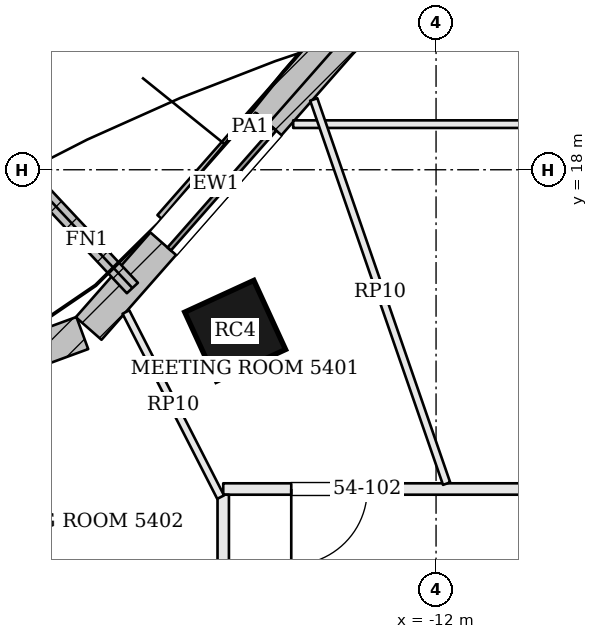
"""IFC4 building model, lengths in metres.
Left out: names, types, materials, properties, quantities, classifications, styles, units other than length and angle.
Written with IfcOpenShell. Run it as: python <this file> out.ifc"""

import sys

from ifc_helpers import new_model, si_unit, direction, frame, frame_2d, origin, origin_2d, place, context, subcontext, project, spatial, rectangle, extrude, element, fill, save


model = new_model("IFC4")
c1 = context("Model", 3, precision=1e-05, world=origin(), true_north=direction((0.0, 1.0)))
c2 = subcontext(c1, "Body", "Model", "MODEL_VIEW")
j1 = project(units=[si_unit("LENGTHUNIT", "METRE"), si_unit("PLANEANGLEUNIT", "RADIAN")], contexts=[c1])
p1 = place(None, origin())
s1 = spatial("IfcSite", under=j1, at=p1, CompositionType="ELEMENT")
p2 = place(p1, origin())
s2 = spatial("IfcBuilding", under=s1, at=p2, CompositionType="ELEMENT")
p3 = place(p2, frame((0.0, 0.0, 221.4)))
s3 = spatial("IfcBuildingStorey", under=s2, at=p3, CompositionType="ELEMENT", Elevation=221.4)
p4 = place(p3, frame((-14.643, 15.881, 0.0), z_axis=(0.0, 0.0, 1.0), x_axis=(-0.908778580451, -0.417278673927, 0.0)))
e1 = element("IfcColumn", 1, at=p4, inside=s3, PredefinedType="COLUMN", context=c2, shape_type="SweptSolid", body=[
    extrude(rectangle(XDim=1.0, YDim=1.0, at=origin_2d()), origin(), (0.0, 0.0, 1.0), 3.9),
])
p5 = place(p3, frame((-11.027, 21.779, 0.0), z_axis=(0.0, 0.0, 1.0), x_axis=(-0.728871214251, -0.684650825631, 0.0)))
e2 = element("IfcWall", 2, at=p5, inside=s3, PredefinedType="SOLIDWALL", context=c2, shape_type="SweptSolid", body=[
    extrude(rectangle(XDim=3.031, YDim=0.45, at=frame_2d((1.516, 0.0))), origin(), (0.0, 0.0, 1.0), 3.7),
])
p6 = place(p5, frame((0.466, 0.0, 0.9)))
e3 = element("IfcOpeningElement", 3, at=p6, cuts=e2, PredefinedType="OPENING", context=c2, shape_type="SweptSolid", body=[
    extrude(rectangle(XDim=2.1, YDim=2.3, at=frame_2d((1.05, 1.15))), frame((0.0, 0.235, 0.0), z_axis=(0.0, -1.0, 0.0), x_axis=(1.0, 0.0, 0.0)), (0.0, 0.0, 1.0), 0.47),
])
p7 = place(p3, frame((-13.221, 19.719, 0.0), z_axis=(0.0, 0.0, 1.0), x_axis=(-0.660424908916, -0.750892095899, 0.0)))
e4 = element("IfcWall", 4, at=p7, inside=s3, PredefinedType="SOLIDWALL", context=c2, shape_type="SweptSolid", body=[
    extrude(rectangle(XDim=5.071, YDim=0.45, at=frame_2d((2.535, 0.0))), origin(), (0.0, 0.0, 1.0), 3.7),
])
p8 = place(p7, frame((1.485, 0.0, 0.9)))
e5 = element("IfcOpeningElement", 5, at=p8, cuts=e4, PredefinedType="OPENING", context=c2, shape_type="SweptSolid", body=[
    extrude(rectangle(XDim=2.1, YDim=2.3, at=frame_2d((1.05, 1.15))), frame((0.0, 0.235, 0.0), z_axis=(0.0, -1.0, 0.0), x_axis=(1.0, 0.0, 0.0)), (0.0, 0.0, 1.0), 0.47),
])
p9 = place(p3, frame((-16.654, 15.852, 0.0), z_axis=(0.0, 0.0, 1.0), x_axis=(-0.938636568132, -0.344907803572, 0.0)))
e6 = element("IfcWall", 6, at=p9, inside=s3, PredefinedType="SOLIDWALL", context=c2, shape_type="SweptSolid", body=[
    extrude(rectangle(XDim=3.887, YDim=0.45, at=frame_2d((1.944, 0.0))), origin(), (0.0, 0.0, 1.0), 3.7),
])
p10 = place(p9, frame((1.044, 0.0, 0.9)))
e7 = element("IfcOpeningElement", 7, at=p10, cuts=e6, PredefinedType="OPENING", context=c2, shape_type="SweptSolid", body=[
    extrude(rectangle(XDim=1.8, YDim=2.3, at=frame_2d((0.9, 1.15))), frame((0.0, 0.235, 0.0), z_axis=(0.0, -1.0, 0.0), x_axis=(1.0, 0.0, 0.0)), (0.0, 0.0, 1.0), 0.47),
])
p11 = place(p3, frame((-15.995, 16.444, 0.0), z_axis=(0.0, 0.0, 1.0), x_axis=(-0.683852936488, 0.729619874494, 0.0)))
e8 = element("IfcWall", 8, at=p11, inside=s3, PredefinedType="SOLIDWALL", context=c2, shape_type="SweptSolid", body=[
    extrude(rectangle(XDim=1.75, YDim=0.2, at=frame_2d((0.875, 0.0))), origin(), (0.0, 0.0, 1.0), 3.7),
])
p12 = place(p3, frame((-13.339, 19.822, 3.9), z_axis=(0.0, 0.0, 1.0), x_axis=(-0.660445690116, -0.7508738179, 0.0)))
e9 = element("IfcWall", 9, at=p12, inside=s3, PredefinedType="PARAPET", context=c2, shape_type="SweptSolid", body=[
    extrude(rectangle(XDim=3.353, YDim=0.3, at=frame_2d((1.677, 0.0))), origin(), (0.0, 0.0, 1.0), 1.1),
])
p13 = place(p3, frame((-6.244, 13.8, 0.0), z_axis=(0.0, 0.0, 1.0), x_axis=(-1.0, 0.0, 0.0)))
e10 = element("IfcWall", 10, at=p13, inside=s3, PredefinedType="PARTITIONING", context=c2, shape_type="SweptSolid", body=[
    extrude(rectangle(XDim=8.556, YDim=0.15, at=frame_2d((4.278, 0.0))), origin(), (0.0, 0.0, 1.0), 3.084),
])
p14 = place(p13, frame((1.897, 0.0, 0.0)))
e11 = element("IfcOpeningElement", 11, at=p14, cuts=e10, PredefinedType="OPENING", context=c2, shape_type="SweptSolid", body=[
    extrude(rectangle(XDim=1.8, YDim=2.1, at=frame_2d((0.9, 1.05))), frame((0.0, 0.085, 0.0), z_axis=(0.0, -1.0, 0.0), x_axis=(1.0, 0.0, 0.0)), (0.0, 0.0, 1.0), 0.17),
])
p15 = place(p13, frame((6.661, 0.0, 0.0)))
e12 = element("IfcOpeningElement", 12, at=p15, cuts=e10, PredefinedType="OPENING", context=c2, shape_type="SweptSolid", body=[
    extrude(rectangle(XDim=1.0, YDim=2.4, at=frame_2d((0.5, 1.2))), frame((0.0, 0.085, 0.0), z_axis=(0.0, -1.0, 0.0), x_axis=(1.0, 0.0, 0.0)), (0.0, 0.0, 1.0), 0.17),
])
p16 = place(p3, frame((-14.8, 13.725, 0.0), z_axis=(0.0, 0.0, 1.0), x_axis=(0.0, -1.0, 0.0)))
e13 = element("IfcWall", 13, at=p16, inside=s3, PredefinedType="PARTITIONING", context=c2, shape_type="SweptSolid", body=[
    extrude(rectangle(XDim=15.968, YDim=0.15, at=frame_2d((7.984, 0.0))), origin(), (0.0, 0.0, 1.0), 3.084),
])
p17 = place(p16, frame((2.596, 0.0, 0.0)))
e14 = element("IfcOpeningElement", 14, at=p17, cuts=e13, PredefinedType="OPENING", context=c2, shape_type="SweptSolid", body=[
    extrude(rectangle(XDim=1.0, YDim=2.4, at=frame_2d((0.5, 1.2))), frame((0.0, 0.085, 0.0), z_axis=(0.0, -1.0, 0.0), x_axis=(1.0, 0.0, 0.0)), (0.0, 0.0, 1.0), 0.17),
])
p18 = place(p16, frame((8.25, 0.0, 0.0)))
e15 = element("IfcOpeningElement", 15, at=p18, cuts=e13, PredefinedType="OPENING", context=c2, shape_type="SweptSolid", body=[
    extrude(rectangle(XDim=1.0, YDim=2.1, at=frame_2d((0.5, 1.05))), frame((0.0, 0.085, 0.0), z_axis=(0.0, -1.0, 0.0), x_axis=(1.0, 0.0, 0.0)), (0.0, 0.0, 1.0), 0.17),
])
p19 = place(p16, frame((13.15, 0.0, 0.0)))
e16 = element("IfcOpeningElement", 16, at=p19, cuts=e13, PredefinedType="OPENING", context=c2, shape_type="SweptSolid", body=[
    extrude(rectangle(XDim=1.0, YDim=2.1, at=frame_2d((0.5, 1.05))), frame((0.0, 0.085, 0.0), z_axis=(0.0, -1.0, 0.0), x_axis=(1.0, 0.0, 0.0)), (0.0, 0.0, 1.0), 0.17),
])
p20 = place(p3, frame((-13.88, 18.6, 0.0), z_axis=(0.0, 0.0, 1.0), x_axis=(1.0, 0.0, 0.0)))
e17 = element("IfcWall", 17, at=p20, inside=s3, PredefinedType="PARTITIONING", context=c2, shape_type="SweptSolid", body=[
    extrude(rectangle(XDim=6.947, YDim=0.1, at=frame_2d((3.473, 0.0))), origin(), (0.0, 0.0, 1.0), 3.084),
])
p21 = place(p3, frame((-11.861, 13.871, 0.0), z_axis=(0.0, 0.0, 1.0), x_axis=(-0.326836144326, 0.945081020211, 0.0)))
e18 = element("IfcWall", 18, at=p21, inside=s3, PredefinedType="PARTITIONING", context=c2, shape_type="SweptSolid", body=[
    extrude(rectangle(XDim=5.348, YDim=0.1, at=frame_2d((2.674, 0.0))), origin(), (0.0, 0.0, 1.0), 3.084),
])
p22 = place(p3, frame((-14.834, 13.693, 0.0), z_axis=(0.0, 0.0, 1.0), x_axis=(-0.455511992018, 0.89022964741, 0.0)))
e19 = element("IfcWall", 19, at=p22, inside=s3, PredefinedType="PARTITIONING", context=c2, shape_type="SweptSolid", body=[
    extrude(rectangle(XDim=2.736, YDim=0.1, at=frame_2d((1.368, 0.0))), origin(), (0.0, 0.0, 1.0), 3.084),
])
p23 = place(p8, origin())
e20 = element("IfcWindow", 20, at=p23, inside=s3, PartitioningType="SINGLE_PANEL", PredefinedType="WINDOW", context=c2, shape_type="SweptSolid", body=[
    extrude(rectangle(XDim=2.1, YDim=2.3, at=frame_2d((1.05, 1.15))), frame((0.0, 0.135, 0.0), z_axis=(0.0, -1.0, 0.0), x_axis=(1.0, 0.0, 0.0)), (0.0, 0.0, 1.0), 0.06),
])
fill(e5, e20)
p24 = place(p15, origin())
e21 = element("IfcDoor", 21, at=p24, inside=s3, OperationType="SINGLE_SWING_RIGHT", PredefinedType="DOOR", context=c2, shape_type="SweptSolid", body=[
    extrude(rectangle(XDim=1.0, YDim=2.4, at=frame_2d((0.5, 1.2))), frame((0.0, 0.025, 0.0), z_axis=(0.0, -1.0, 0.0), x_axis=(1.0, 0.0, 0.0)), (0.0, 0.0, 1.0), 0.05),
])
fill(e12, e21)
save(model, sys.argv[1])
